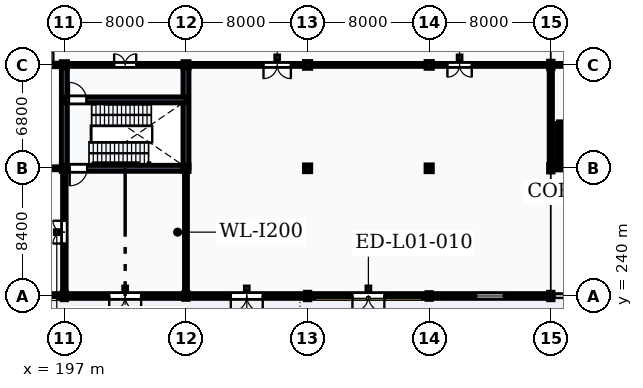
"""IFC4 building model, lengths in metres.
Left out: names, types, materials, properties, quantities, classifications, styles, units other than length and angle.
Written with IfcOpenShell. Run it as: python <this file> out.ifc"""

import sys

from ifc_helpers import new_model, si_unit, direction, frame, frame_2d, origin, origin_2d, place, context, subcontext, project, spatial, rectangle, i_section, extrude, element, fill, save


model = new_model("IFC4")
c1 = context("Model", 3, precision=1e-05, world=origin(), true_north=direction((0.0, 1.0)))
c2 = subcontext(c1, "Body", "Model", "MODEL_VIEW")
j1 = project(units=[si_unit("LENGTHUNIT", "METRE"), si_unit("PLANEANGLEUNIT", "RADIAN")], contexts=[c1])
p1 = place(None, origin())
s1 = spatial("IfcSite", under=j1, at=p1, CompositionType="ELEMENT")
p2 = place(p1, origin())
s2 = spatial("IfcBuilding", under=s1, at=p2, CompositionType="ELEMENT")
p3 = place(p2, origin())
s3 = spatial("IfcBuildingStorey", under=s2, at=p3, CompositionType="ELEMENT", Elevation=0.0)
p4 = place(p3, frame((197.0, 240.0, 0.0), z_axis=(0.0, 0.0, 1.0), x_axis=(1.0, 0.0, 0.0)))
e1 = element("IfcColumn", 1, at=p4, inside=s3, PredefinedType="COLUMN", context=c2, shape_type="SweptSolid", body=[
    extrude(i_section(OverallWidth=0.3, OverallDepth=0.5, WebThickness=0.014, FlangeThickness=0.028, FilletRadius=0.027, at=origin_2d()), origin(), (0.0, 0.0, 1.0), 5.4),
])
for number, where, z_axis, x_axis in (
    (2, (197.0, 248.4, 0.0), (0.0, 0.0, 1.0), (1.0, 0.0, 0.0)),
    (3, (197.0, 255.2, 0.0), (0.0, 0.0, 1.0), (1.0, 0.0, 0.0)),
):
    element("IfcColumn", number, at=place(p3, frame(where, z_axis=z_axis, x_axis=x_axis)), inside=s3, PredefinedType="COLUMN", context=c2, shape_type="SweptSolid", body=[
        extrude(i_section(OverallWidth=0.412, OverallDepth=0.435, WebThickness=0.036, FlangeThickness=0.057, FilletRadius=0.015, at=origin_2d()), origin(), (0.0, 0.0, 1.0), 5.4),
    ])
p5 = place(p3, frame((205.0, 240.0, 0.0), z_axis=(0.0, 0.0, 1.0), x_axis=(1.0, 0.0, 0.0)))
e4 = element("IfcColumn", 4, at=p5, inside=s3, PredefinedType="COLUMN", context=c2, shape_type="SweptSolid", body=[
    extrude(i_section(OverallWidth=0.3, OverallDepth=0.45, WebThickness=0.014, FlangeThickness=0.026, FilletRadius=0.027, at=origin_2d()), origin(), (0.0, 0.0, 1.0), 5.4),
])
for number, where, z_axis, x_axis in (
    (5, (205.0, 248.4, 0.0), (0.0, 0.0, 1.0), (1.0, 0.0, 0.0)),
    (6, (205.0, 255.2, 0.0), (0.0, 0.0, 1.0), (1.0, 0.0, 0.0)),
):
    element("IfcColumn", number, at=place(p3, frame(where, z_axis=z_axis, x_axis=x_axis)), inside=s3, PredefinedType="COLUMN", context=c2, shape_type="SweptSolid", body=[
        extrude(i_section(OverallWidth=0.412, OverallDepth=0.435, WebThickness=0.036, FlangeThickness=0.057, FilletRadius=0.015, at=origin_2d()), origin(), (0.0, 0.0, 1.0), 5.4),
    ])
p6 = place(p3, frame((213.0, 240.0, 0.0), z_axis=(0.0, 0.0, 1.0), x_axis=(1.0, 0.0, 0.0)))
e7 = element("IfcColumn", 7, at=p6, inside=s3, PredefinedType="COLUMN", context=c2, shape_type="SweptSolid", body=[
    extrude(i_section(OverallWidth=0.3, OverallDepth=0.5, WebThickness=0.014, FlangeThickness=0.028, FilletRadius=0.027, at=origin_2d()), origin(), (0.0, 0.0, 1.0), 5.4),
])
for number, where, z_axis, x_axis in (
    (8, (213.0, 248.4, 0.0), (0.0, 0.0, 1.0), (1.0, 0.0, 0.0)),
    (9, (213.0, 255.2, 0.0), (0.0, 0.0, 1.0), (1.0, 0.0, 0.0)),
):
    element("IfcColumn", number, at=place(p3, frame(where, z_axis=z_axis, x_axis=x_axis)), inside=s3, PredefinedType="COLUMN", context=c2, shape_type="SweptSolid", body=[
        extrude(i_section(OverallWidth=0.418, OverallDepth=0.455, WebThickness=0.042, FlangeThickness=0.068, FilletRadius=0.015, at=origin_2d()), origin(), (0.0, 0.0, 1.0), 5.4),
    ])
p7 = place(p3, frame((221.0, 240.0, 0.0), z_axis=(0.0, 0.0, 1.0), x_axis=(1.0, 0.0, 0.0)))
e10 = element("IfcColumn", 10, at=p7, inside=s3, PredefinedType="COLUMN", context=c2, shape_type="SweptSolid", body=[
    extrude(i_section(OverallWidth=0.3, OverallDepth=0.45, WebThickness=0.014, FlangeThickness=0.026, FilletRadius=0.027, at=origin_2d()), origin(), (0.0, 0.0, 1.0), 5.4),
])
for number, where, z_axis, x_axis in (
    (11, (221.0, 248.4, 0.0), (0.0, 0.0, 1.0), (1.0, 0.0, 0.0)),
    (12, (221.0, 255.2, 0.0), (0.0, 0.0, 1.0), (1.0, 0.0, 0.0)),
):
    element("IfcColumn", number, at=place(p3, frame(where, z_axis=z_axis, x_axis=x_axis)), inside=s3, PredefinedType="COLUMN", context=c2, shape_type="SweptSolid", body=[
        extrude(i_section(OverallWidth=0.418, OverallDepth=0.455, WebThickness=0.042, FlangeThickness=0.068, FilletRadius=0.015, at=origin_2d()), origin(), (0.0, 0.0, 1.0), 5.4),
    ])
for number, where, z_axis, x_axis in (
    (13, (229.0, 240.0, 0.0), (0.0, 0.0, 1.0), (1.0, 0.0, 0.0)),
    (14, (229.0, 248.4, 0.0), (0.0, 0.0, 1.0), (1.0, 0.0, 0.0)),
    (15, (229.0, 255.2, 0.0), (0.0, 0.0, 1.0), (1.0, 0.0, 0.0)),
):
    element("IfcColumn", number, at=place(p3, frame(where, z_axis=z_axis, x_axis=x_axis)), inside=s3, PredefinedType="COLUMN", context=c2, shape_type="SweptSolid", body=[
        extrude(i_section(OverallWidth=0.3, OverallDepth=0.5, WebThickness=0.014, FlangeThickness=0.028, FilletRadius=0.027, at=origin_2d()), origin(), (0.0, 0.0, 1.0), 5.4),
    ])
p8 = place(p3, frame((189.006, 240.0, 0.0), z_axis=(0.0, 0.0, 1.0), x_axis=(1.0, 0.0, 0.0)))
e16 = element("IfcWall", 16, at=p8, inside=s3, PredefinedType="SOLIDWALL", context=c2, shape_type="SweptSolid", body=[
    extrude(rectangle(XDim=7.988, YDim=0.32, at=frame_2d((3.994, 0.0))), origin(), (0.0, 0.0, 1.0), 4.838),
])
p9 = place(p8, frame((2.944, 0.0, 0.0)))
e17 = element("IfcOpeningElement", 17, at=p9, cuts=e16, PredefinedType="OPENING", context=c2, shape_type="SweptSolid", body=[
    extrude(rectangle(XDim=2.1, YDim=2.7, at=frame_2d((1.05, 1.35))), frame((0.0, 0.175, 0.0), z_axis=(0.0, -1.0, 0.0), x_axis=(1.0, 0.0, 0.0)), (0.0, 0.0, 1.0), 0.35),
])
p10 = place(p3, frame((197.006, 240.0, 0.0), z_axis=(0.0, 0.0, 1.0), x_axis=(1.0, 0.0, 0.0)))
e18 = element("IfcWall", 18, at=p10, inside=s3, PredefinedType="SOLIDWALL", context=c2, shape_type="SweptSolid", body=[
    extrude(rectangle(XDim=7.988, YDim=0.32, at=frame_2d((3.994, 0.0))), origin(), (0.0, 0.0, 1.0), 4.838),
])
p11 = place(p10, frame((2.944, 0.0, 0.0)))
e19 = element("IfcOpeningElement", 19, at=p11, cuts=e18, PredefinedType="OPENING", context=c2, shape_type="SweptSolid", body=[
    extrude(rectangle(XDim=2.1, YDim=2.7, at=frame_2d((1.05, 1.35))), frame((0.0, 0.175, 0.0), z_axis=(0.0, -1.0, 0.0), x_axis=(1.0, 0.0, 0.0)), (0.0, 0.0, 1.0), 0.35),
])
p12 = place(p3, frame((205.006, 240.0, 0.0), z_axis=(0.0, 0.0, 1.0), x_axis=(1.0, 0.0, 0.0)))
e20 = element("IfcWall", 20, at=p12, inside=s3, PredefinedType="SOLIDWALL", context=c2, shape_type="SweptSolid", body=[
    extrude(rectangle(XDim=7.988, YDim=0.32, at=frame_2d((3.994, 0.0))), origin(), (0.0, 0.0, 1.0), 4.838),
])
p13 = place(p12, frame((2.944, 0.0, 0.0)))
e21 = element("IfcOpeningElement", 21, at=p13, cuts=e20, PredefinedType="OPENING", context=c2, shape_type="SweptSolid", body=[
    extrude(rectangle(XDim=2.1, YDim=2.7, at=frame_2d((1.05, 1.35))), frame((0.0, 0.175, 0.0), z_axis=(0.0, -1.0, 0.0), x_axis=(1.0, 0.0, 0.0)), (0.0, 0.0, 1.0), 0.35),
])
p14 = place(p3, frame((213.006, 240.0, 0.0), z_axis=(0.0, 0.0, 1.0), x_axis=(1.0, 0.0, 0.0)))
e22 = element("IfcWall", 22, at=p14, inside=s3, PredefinedType="SOLIDWALL", context=c2, shape_type="SweptSolid", body=[
    extrude(rectangle(XDim=7.988, YDim=0.32, at=frame_2d((3.994, 0.0))), origin(), (0.0, 0.0, 1.0), 4.838),
])
p15 = place(p14, frame((2.944, 0.0, 0.0)))
e23 = element("IfcOpeningElement", 23, at=p15, cuts=e22, PredefinedType="OPENING", context=c2, shape_type="SweptSolid", body=[
    extrude(rectangle(XDim=2.1, YDim=2.7, at=frame_2d((1.05, 1.35))), frame((0.0, 0.175, 0.0), z_axis=(0.0, -1.0, 0.0), x_axis=(1.0, 0.0, 0.0)), (0.0, 0.0, 1.0), 0.35),
])
p16 = place(p3, frame((221.006, 240.0, 0.0), z_axis=(0.0, 0.0, 1.0), x_axis=(1.0, 0.0, 0.0)))
e24 = element("IfcWall", 24, at=p16, inside=s3, PredefinedType="SOLIDWALL", context=c2, shape_type="SweptSolid", body=[
    extrude(rectangle(XDim=7.988, YDim=0.32, at=frame_2d((3.994, 0.0))), origin(), (0.0, 0.0, 1.0), 4.838),
])
p17 = place(p16, frame((3.094, 0.0, 0.95)))
e25 = element("IfcOpeningElement", 25, at=p17, cuts=e24, PredefinedType="OPENING", context=c2, shape_type="SweptSolid", body=[
    extrude(rectangle(XDim=1.8, YDim=2.6, at=frame_2d((0.9, 1.3))), frame((0.0, 0.175, 0.0), z_axis=(0.0, -1.0, 0.0), x_axis=(1.0, 0.0, 0.0)), (0.0, 0.0, 1.0), 0.35),
])
p18 = place(p3, frame((120.1, 240.1, 5.4), z_axis=(0.0, 0.0, 1.0), x_axis=(1.0, 0.0, 0.0)))
e26 = element("IfcWall", 26, at=p18, inside=s3, PredefinedType="PARAPET", context=c2, shape_type="SweptSolid", body=[
    extrude(rectangle(XDim=167.8, YDim=0.18, at=frame_2d((83.9, 0.0))), origin(), (0.0, 0.0, 1.0), 1.2),
])
p19 = place(p3, frame((197.0, 248.4, 0.0), z_axis=(0.0, 0.0, 1.0), x_axis=(1.0, 0.0, 0.0)))
e27 = element("IfcWall", 27, at=p19, inside=s3, PredefinedType="SHEAR", context=c2, shape_type="SweptSolid", body=[
    extrude(rectangle(XDim=8.0, YDim=0.4, at=frame_2d((4.0, 0.0))), origin(), (0.0, 0.0, 1.0), 5.14),
])
p20 = place(p19, frame((0.35, 0.0, 0.0)))
e28 = element("IfcOpeningElement", 28, at=p20, cuts=e27, PredefinedType="OPENING", context=c2, shape_type="SweptSolid", body=[
    extrude(rectangle(XDim=1.15, YDim=2.15, at=frame_2d((0.575, 1.075))), frame((0.0, 0.215, 0.0), z_axis=(0.0, -1.0, 0.0), x_axis=(1.0, 0.0, 0.0)), (0.0, 0.0, 1.0), 0.43),
])
for number, where, z_axis, x_axis in (
    (29, (197.0, 248.4, 0.0), (0.0, 0.0, 1.0), (0.0, 1.0, 0.0)),
    (30, (205.0, 248.4, 0.0), (0.0, 0.0, 1.0), (0.0, 1.0, 0.0)),
):
    element("IfcWall", number, at=place(p3, frame(where, z_axis=z_axis, x_axis=x_axis)), inside=s3, PredefinedType="SHEAR", context=c2, shape_type="SweptSolid", body=[
        extrude(rectangle(XDim=6.8, YDim=0.4, at=frame_2d((3.4, 0.0))), origin(), (0.0, 0.0, 1.0), 5.14),
    ])
p21 = place(p3, frame((197.0, 252.9, 0.0), z_axis=(0.0, 0.0, 1.0), x_axis=(1.0, 0.0, 0.0)))
e31 = element("IfcWall", 31, at=p21, inside=s3, PredefinedType="SHEAR", context=c2, shape_type="SweptSolid", body=[
    extrude(rectangle(XDim=8.0, YDim=0.4, at=frame_2d((4.0, 0.0))), origin(), (0.0, 0.0, 1.0), 5.14),
])
p22 = place(p21, frame((0.3, 0.0, 0.0)))
e32 = element("IfcOpeningElement", 32, at=p22, cuts=e31, PredefinedType="OPENING", context=c2, shape_type="SweptSolid", body=[
    extrude(rectangle(XDim=1.15, YDim=2.15, at=frame_2d((0.575, 1.075))), frame((0.0, 0.215, 0.0), z_axis=(0.0, -1.0, 0.0), x_axis=(1.0, 0.0, 0.0)), (0.0, 0.0, 1.0), 0.43),
])
p23 = place(p3, frame((197.0, 255.2, 0.0), z_axis=(0.0, 0.0, 1.0), x_axis=(1.0, 0.0, 0.0)))
e33 = element("IfcWall", 33, at=p23, inside=s3, PredefinedType="PARTITIONING", context=c2, shape_type="SweptSolid", body=[
    extrude(rectangle(XDim=8.0, YDim=0.2, at=frame_2d((4.0, 0.0))), origin(), (0.0, 0.0, 1.0), 4.638),
])
p24 = place(p23, frame((3.275, 0.0, 0.0)))
e34 = element("IfcOpeningElement", 34, at=p24, cuts=e33, PredefinedType="OPENING", context=c2, shape_type="SweptSolid", body=[
    extrude(rectangle(XDim=1.45, YDim=2.2, at=frame_2d((0.725, 1.1))), frame((0.0, 0.115, 0.0), z_axis=(0.0, -1.0, 0.0), x_axis=(1.0, 0.0, 0.0)), (0.0, 0.0, 1.0), 0.23),
])
p25 = place(p3, frame((229.5, 248.65, 0.0), z_axis=(0.0, 0.0, 1.0), x_axis=(1.0, 0.0, 0.0)))
e35 = element("IfcWall", 35, at=p25, inside=s3, PredefinedType="SHEAR", context=c2, shape_type="SweptSolid", body=[
    extrude(rectangle(XDim=2.2, YDim=0.22, at=frame_2d((1.1, 0.0))), origin(), (0.0, 0.0, 1.0), 5.14),
])
p26 = place(p3, frame((229.5, 248.65, 0.0), z_axis=(0.0, 0.0, 1.0), x_axis=(0.0, 1.0, 0.0)))
e36 = element("IfcWall", 36, at=p26, inside=s3, PredefinedType="SHEAR", context=c2, shape_type="SweptSolid", body=[
    extrude(rectangle(XDim=2.7, YDim=0.22, at=frame_2d((1.35, 0.0))), origin(), (0.0, 0.0, 1.0), 5.14),
])
p27 = place(p3, frame((229.5, 251.35, 0.0), z_axis=(0.0, 0.0, 1.0), x_axis=(1.0, 0.0, 0.0)))
e37 = element("IfcWall", 37, at=p27, inside=s3, PredefinedType="SHEAR", context=c2, shape_type="SweptSolid", body=[
    extrude(rectangle(XDim=2.2, YDim=0.22, at=frame_2d((1.1, 0.0))), origin(), (0.0, 0.0, 1.0), 5.14),
])
p28 = place(p27, frame((0.5, 0.0, 0.0)))
e38 = element("IfcOpeningElement", 38, at=p28, cuts=e37, PredefinedType="OPENING", context=c2, shape_type="SweptSolid", body=[
    extrude(rectangle(XDim=1.2, YDim=2.2, at=frame_2d((0.6, 1.1))), frame((0.0, 0.125, 0.0), z_axis=(0.0, -1.0, 0.0), x_axis=(1.0, 0.0, 0.0)), (0.0, 0.0, 1.0), 0.25),
])
p29 = place(p3, frame((189.0, 255.2, 0.0), z_axis=(0.0, 0.0, 1.0), x_axis=(1.0, 0.0, 0.0)))
e39 = element("IfcWall", 39, at=p29, inside=s3, PredefinedType="PARTITIONING", context=c2, shape_type="SweptSolid", body=[
    extrude(rectangle(XDim=8.0, YDim=0.24, at=frame_2d((4.0, 0.0))), origin(), (0.0, 0.0, 1.0), 4.638),
])
p30 = place(p29, frame((1.05, 0.0, 0.0)))
e40 = element("IfcOpeningElement", 40, at=p30, cuts=e39, PredefinedType="OPENING", context=c2, shape_type="SweptSolid", body=[
    extrude(rectangle(XDim=1.0, YDim=2.1, at=frame_2d((0.5, 1.05))), frame((0.0, 0.135, 0.0), z_axis=(0.0, -1.0, 0.0), x_axis=(1.0, 0.0, 0.0)), (0.0, 0.0, 1.0), 0.27),
])
p31 = place(p29, frame((3.6, 0.0, 0.0)))
e41 = element("IfcOpeningElement", 41, at=p31, cuts=e39, PredefinedType="OPENING", context=c2, shape_type="SweptSolid", body=[
    extrude(rectangle(XDim=1.5, YDim=2.25, at=frame_2d((0.75, 1.125))), frame((0.0, 0.135, 0.0), z_axis=(0.0, -1.0, 0.0), x_axis=(1.0, 0.0, 0.0)), (0.0, 0.0, 1.0), 0.27),
])
p32 = place(p29, frame((6.425, 0.0, 0.0)))
e42 = element("IfcOpeningElement", 42, at=p32, cuts=e39, PredefinedType="OPENING", context=c2, shape_type="SweptSolid", body=[
    extrude(rectangle(XDim=0.85, YDim=2.1, at=frame_2d((0.425, 1.05))), frame((0.0, 0.135, 0.0), z_axis=(0.0, -1.0, 0.0), x_axis=(1.0, 0.0, 0.0)), (0.0, 0.0, 1.0), 0.27),
])
p33 = place(p3, frame((229.0, 248.4, 0.0), z_axis=(0.0, 0.0, 1.0), x_axis=(0.0, 1.0, 0.0)))
e43 = element("IfcWall", 43, at=p33, inside=s3, PredefinedType="PARTITIONING", context=c2, shape_type="SweptSolid", body=[
    extrude(rectangle(XDim=6.8, YDim=0.22, at=frame_2d((3.4, 0.0))), origin(), (0.0, 0.0, 1.0), 4.778),
])
p34 = place(p3, frame((229.0, 248.4, 0.0), z_axis=(0.0, 0.0, 1.0), x_axis=(1.0, 0.0, 0.0)))
e44 = element("IfcWall", 44, at=p34, inside=s3, PredefinedType="PARTITIONING", context=c2, shape_type="SweptSolid", body=[
    extrude(rectangle(XDim=8.0, YDim=0.22, at=frame_2d((4.0, 0.0))), origin(), (0.0, 0.0, 1.0), 4.688),
])
p35 = place(p3, frame((229.0, 255.2, 0.0), z_axis=(0.0, 0.0, 1.0), x_axis=(1.0, 0.0, 0.0)))
e45 = element("IfcWall", 45, at=p35, inside=s3, PredefinedType="PARTITIONING", context=c2, shape_type="SweptSolid", body=[
    extrude(rectangle(XDim=8.0, YDim=0.2, at=frame_2d((4.0, 0.0))), origin(), (0.0, 0.0, 1.0), 4.688),
])
p36 = place(p35, frame((3.1, 0.0, 0.0)))
e46 = element("IfcOpeningElement", 46, at=p36, cuts=e45, PredefinedType="OPENING", context=c2, shape_type="SweptSolid", body=[
    extrude(rectangle(XDim=1.8, YDim=2.4, at=frame_2d((0.9, 1.2))), frame((0.0, 0.115, 0.0), z_axis=(0.0, -1.0, 0.0), x_axis=(1.0, 0.0, 0.0)), (0.0, 0.0, 1.0), 0.23),
])
p37 = place(p3, frame((197.0, 240.0, 0.0), z_axis=(0.0, 0.0, 1.0), x_axis=(0.0, 1.0, 0.0)))
e47 = element("IfcWall", 47, at=p37, inside=s3, PredefinedType="PARTITIONING", context=c2, shape_type="SweptSolid", body=[
    extrude(rectangle(XDim=8.4, YDim=0.24, at=frame_2d((4.2, 0.0))), origin(), (0.0, 0.0, 1.0), 4.688),
])
p38 = place(p37, frame((3.45, 0.0, 0.0)))
e48 = element("IfcOpeningElement", 48, at=p38, cuts=e47, PredefinedType="OPENING", context=c2, shape_type="SweptSolid", body=[
    extrude(rectangle(XDim=1.5, YDim=2.1, at=frame_2d((0.75, 1.05))), frame((0.0, 0.135, 0.0), z_axis=(0.0, -1.0, 0.0), x_axis=(1.0, 0.0, 0.0)), (0.0, 0.0, 1.0), 0.27),
])
p39 = place(p3, frame((189.0, 248.4, 0.0), z_axis=(0.0, 0.0, 1.0), x_axis=(1.0, 0.0, 0.0)))
e49 = element("IfcWall", 49, at=p39, inside=s3, PredefinedType="PARTITIONING", context=c2, shape_type="SweptSolid", body=[
    extrude(rectangle(XDim=8.0, YDim=0.2, at=frame_2d((4.0, 0.0))), origin(), (0.0, 0.0, 1.0), 4.638),
])
p40 = place(p3, frame((205.0, 240.0, 0.0), z_axis=(0.0, 0.0, 1.0), x_axis=(0.0, 1.0, 0.0)))
e50 = element("IfcWall", 50, at=p40, inside=s3, PredefinedType="PARTITIONING", context=c2, shape_type="SweptSolid", body=[
    extrude(rectangle(XDim=8.4, YDim=0.2, at=frame_2d((4.2, 0.0))), origin(), (0.0, 0.0, 1.0), 4.688),
])
p41 = place(p3, frame((205.0, 255.2, 0.0), z_axis=(0.0, 0.0, 1.0), x_axis=(1.0, 0.0, 0.0)))
e51 = element("IfcWall", 51, at=p41, inside=s3, PredefinedType="PARTITIONING", context=c2, shape_type="SweptSolid", body=[
    extrude(rectangle(XDim=24.0, YDim=0.2, at=frame_2d((12.0, 0.0))), origin(), (0.0, 0.0, 1.0), 4.638),
])
p42 = place(p41, frame((5.1, 0.0, 0.0)))
e52 = element("IfcOpeningElement", 52, at=p42, cuts=e51, PredefinedType="OPENING", context=c2, shape_type="SweptSolid", body=[
    extrude(rectangle(XDim=1.8, YDim=2.4, at=frame_2d((0.9, 1.2))), frame((0.0, 0.115, 0.0), z_axis=(0.0, -1.0, 0.0), x_axis=(1.0, 0.0, 0.0)), (0.0, 0.0, 1.0), 0.23),
])
p43 = place(p41, frame((17.2, 0.0, 0.0)))
e53 = element("IfcOpeningElement", 53, at=p43, cuts=e51, PredefinedType="OPENING", context=c2, shape_type="SweptSolid", body=[
    extrude(rectangle(XDim=1.6, YDim=2.25, at=frame_2d((0.8, 1.125))), frame((0.0, 0.115, 0.0), z_axis=(0.0, -1.0, 0.0), x_axis=(1.0, 0.0, 0.0)), (0.0, 0.0, 1.0), 0.23),
])
p44 = place(p11, frame((2.1, 0.0, 0.0), z_axis=(0.0, 0.0, 1.0), x_axis=(-1.0, 0.0, 0.0)))
e54 = element("IfcDoor", 54, at=p44, inside=s3, OperationType="DOUBLE_DOOR_SINGLE_SWING", PredefinedType="DOOR", context=c2, shape_type="SweptSolid", body=[
    extrude(rectangle(XDim=2.1, YDim=2.7, at=frame_2d((1.05, 1.35))), frame((0.0, 0.025, 0.0), z_axis=(0.0, -1.0, 0.0), x_axis=(1.0, 0.0, 0.0)), (0.0, 0.0, 1.0), 0.05),
])
fill(e19, e54)
p45 = place(p13, frame((2.1, 0.0, 0.0), z_axis=(0.0, 0.0, 1.0), x_axis=(-1.0, 0.0, 0.0)))
e55 = element("IfcDoor", 55, at=p45, inside=s3, OperationType="DOUBLE_DOOR_SINGLE_SWING", PredefinedType="DOOR", context=c2, shape_type="SweptSolid", body=[
    extrude(rectangle(XDim=2.1, YDim=2.7, at=frame_2d((1.05, 1.35))), frame((0.0, 0.025, 0.0), z_axis=(0.0, -1.0, 0.0), x_axis=(1.0, 0.0, 0.0)), (0.0, 0.0, 1.0), 0.05),
])
fill(e21, e55)
p46 = place(p15, frame((2.1, 0.0, 0.0), z_axis=(0.0, 0.0, 1.0), x_axis=(-1.0, 0.0, 0.0)))
e56 = element("IfcDoor", 56, at=p46, inside=s3, OperationType="DOUBLE_DOOR_SINGLE_SWING", PredefinedType="DOOR", context=c2, shape_type="SweptSolid", body=[
    extrude(rectangle(XDim=2.1, YDim=2.7, at=frame_2d((1.05, 1.35))), frame((0.0, 0.025, 0.0), z_axis=(0.0, -1.0, 0.0), x_axis=(1.0, 0.0, 0.0)), (0.0, 0.0, 1.0), 0.05),
])
fill(e23, e56)
p47 = place(p17, origin())
e57 = element("IfcWindow", 57, at=p47, inside=s3, PartitioningType="DOUBLE_PANEL_VERTICAL", PredefinedType="WINDOW", context=c2, shape_type="SweptSolid", body=[
    extrude(rectangle(XDim=1.8, YDim=2.6, at=frame_2d((0.9, 1.3))), frame((0.0, 0.03, 0.0), z_axis=(0.0, -1.0, 0.0), x_axis=(1.0, 0.0, 0.0)), (0.0, 0.0, 1.0), 0.06),
])
fill(e25, e57)
p48 = place(p22, origin())
e58 = element("IfcDoor", 58, at=p48, inside=s3, OperationType="SINGLE_SWING_LEFT", PredefinedType="DOOR", context=c2, shape_type="SweptSolid", body=[
    extrude(rectangle(XDim=1.15, YDim=2.15, at=frame_2d((0.575, 1.075))), frame((0.0, 0.025, 0.0), z_axis=(0.0, -1.0, 0.0), x_axis=(1.0, 0.0, 0.0)), (0.0, 0.0, 1.0), 0.05),
])
fill(e32, e58)
p49 = place(p20, frame((1.15, 0.0, 0.0), z_axis=(0.0, 0.0, 1.0), x_axis=(-1.0, 0.0, 0.0)))
e59 = element("IfcDoor", 59, at=p49, inside=s3, OperationType="SINGLE_SWING_RIGHT", PredefinedType="DOOR", context=c2, shape_type="SweptSolid", body=[
    extrude(rectangle(XDim=1.15, YDim=2.15, at=frame_2d((0.575, 1.075))), frame((0.0, 0.025, 0.0), z_axis=(0.0, -1.0, 0.0), x_axis=(1.0, 0.0, 0.0)), (0.0, 0.0, 1.0), 0.05),
])
fill(e28, e59)
p50 = place(p24, origin())
e60 = element("IfcDoor", 60, at=p50, inside=s3, OperationType="DOUBLE_DOOR_SINGLE_SWING", PredefinedType="DOOR", context=c2, shape_type="SweptSolid", body=[
    extrude(rectangle(XDim=1.45, YDim=2.2, at=frame_2d((0.725, 1.1))), frame((0.0, 0.025, 0.0), z_axis=(0.0, -1.0, 0.0), x_axis=(1.0, 0.0, 0.0)), (0.0, 0.0, 1.0), 0.05),
])
fill(e34, e60)
p51 = place(p32, frame((0.85, 0.0, 0.0), z_axis=(0.0, 0.0, 1.0), x_axis=(-1.0, 0.0, 0.0)))
e61 = element("IfcDoor", 61, at=p51, inside=s3, OperationType="SINGLE_SWING_LEFT", PredefinedType="DOOR", context=c2, shape_type="SweptSolid", body=[
    extrude(rectangle(XDim=0.85, YDim=2.1, at=frame_2d((0.425, 1.05))), frame((0.0, 0.025, 0.0), z_axis=(0.0, -1.0, 0.0), x_axis=(1.0, 0.0, 0.0)), (0.0, 0.0, 1.0), 0.05),
])
fill(e42, e61)
p52 = place(p38, origin())
e62 = element("IfcDoor", 62, at=p52, inside=s3, OperationType="DOUBLE_DOOR_SINGLE_SWING", PredefinedType="DOOR", context=c2, shape_type="SweptSolid", body=[
    extrude(rectangle(XDim=1.5, YDim=2.1, at=frame_2d((0.75, 1.05))), frame((0.0, 0.025, 0.0), z_axis=(0.0, -1.0, 0.0), x_axis=(1.0, 0.0, 0.0)), (0.0, 0.0, 1.0), 0.05),
])
fill(e48, e62)
p53 = place(p42, frame((1.8, 0.0, 0.0), z_axis=(0.0, 0.0, 1.0), x_axis=(-1.0, 0.0, 0.0)))
e63 = element("IfcDoor", 63, at=p53, inside=s3, OperationType="DOUBLE_DOOR_SINGLE_SWING", PredefinedType="DOOR", context=c2, shape_type="SweptSolid", body=[
    extrude(rectangle(XDim=1.8, YDim=2.4, at=frame_2d((0.9, 1.2))), frame((0.0, 0.025, 0.0), z_axis=(0.0, -1.0, 0.0), x_axis=(1.0, 0.0, 0.0)), (0.0, 0.0, 1.0), 0.05),
])
fill(e52, e63)
p54 = place(p43, frame((1.6, 0.0, 0.0), z_axis=(0.0, 0.0, 1.0), x_axis=(-1.0, 0.0, 0.0)))
e64 = element("IfcDoor", 64, at=p54, inside=s3, OperationType="DOUBLE_DOOR_SINGLE_SWING", PredefinedType="DOOR", context=c2, shape_type="SweptSolid", body=[
    extrude(rectangle(XDim=1.6, YDim=2.25, at=frame_2d((0.8, 1.125))), frame((0.0, 0.025, 0.0), z_axis=(0.0, -1.0, 0.0), x_axis=(1.0, 0.0, 0.0)), (0.0, 0.0, 1.0), 0.05),
])
fill(e53, e64)
save(model, sys.argv[1])
